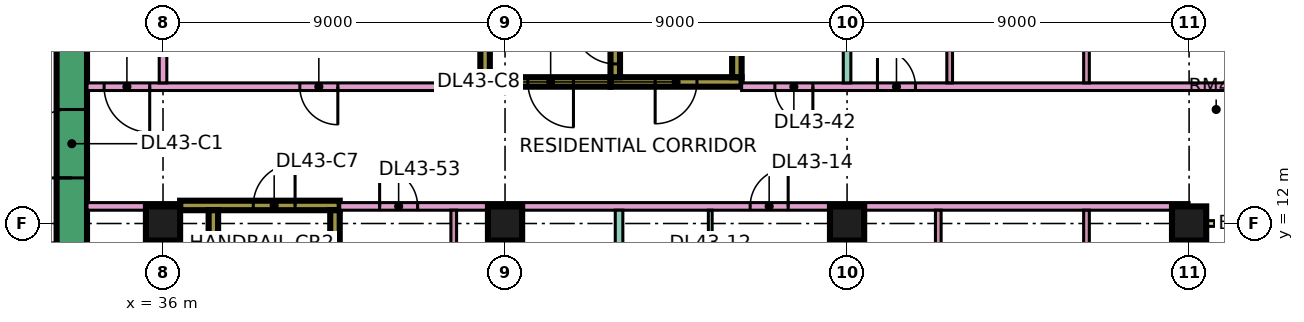
"""IFC4 building model, lengths in metres.
Left out: names, types, materials, properties, quantities, classifications, styles, units other than length and angle.
Written with IfcOpenShell. Run it as: python <this file> out.ifc"""

import sys

from ifc_helpers import new_model, si_unit, direction, frame, frame_2d, origin, origin_2d, place, context, subcontext, project, spatial, rectangle, extrude, element, fill, save


model = new_model("IFC4")
c1 = context("Model", 3, precision=1e-05, world=origin(), true_north=direction((0.0, 1.0)))
c2 = subcontext(c1, "Body", "Model", "MODEL_VIEW")
j1 = project(units=[si_unit("LENGTHUNIT", "METRE"), si_unit("PLANEANGLEUNIT", "RADIAN")], contexts=[c1])
p1 = place(None, origin())
s1 = spatial("IfcSite", under=j1, at=p1, CompositionType="ELEMENT")
p2 = place(p1, origin())
s2 = spatial("IfcBuilding", under=s1, at=p2, CompositionType="ELEMENT")
p3 = place(p2, frame((0.0, 0.0, 187.4)))
s3 = spatial("IfcBuildingStorey", under=s2, at=p3, CompositionType="ELEMENT", Elevation=187.4)
for number, where, z_axis, x_axis in (
    (1, (36.0, 12.0, 0.0), (0.0, 0.0, 1.0), (1.0, 0.0, 0.0)),
    (2, (45.0, 12.0, 0.0), (0.0, 0.0, 1.0), (1.0, 0.0, 0.0)),
    (3, (54.0, 12.0, 0.0), (0.0, 0.0, 1.0), (1.0, 0.0, 0.0)),
    (4, (63.0, 12.0, 0.0), (0.0, 0.0, 1.0), (1.0, 0.0, 0.0)),
):
    element("IfcColumn", number, at=place(p3, frame(where, z_axis=z_axis, x_axis=x_axis)), inside=s3, PredefinedType="COLUMN", context=c2, shape_type="SweptSolid", body=[
        extrude(rectangle(XDim=0.9, YDim=0.9, at=origin_2d()), origin(), (0.0, 0.0, 1.0), 3.75),
    ])
p4 = place(p3, frame((33.6, 7.8, 0.0), z_axis=(0.0, 0.0, 1.0), x_axis=(0.0, 1.0, 0.0)))
e5 = element("IfcWall", 5, at=p4, inside=s3, PredefinedType="SHEAR", context=c2, shape_type="SweptSolid", body=[
    extrude(rectangle(XDim=11.4, YDim=0.8, at=frame_2d((5.7, 0.0))), origin(), (0.0, 0.0, 1.0), 3.75),
])
p5 = place(p4, frame((5.4, 0.0, 0.0)))
e6 = element("IfcOpeningElement", 6, at=p5, cuts=e5, PredefinedType="OPENING", context=c2, shape_type="SweptSolid", body=[
    extrude(rectangle(XDim=1.8, YDim=2.4, at=frame_2d((0.9, 1.2))), frame((0.0, 0.41, 0.0), z_axis=(0.0, -1.0, 0.0), x_axis=(1.0, 0.0, 0.0)), (0.0, 0.0, 1.0), 0.82),
])
p6 = place(p3, frame((36.45, 12.475, 0.0), z_axis=(0.0, 0.0, 1.0), x_axis=(1.0, 0.0, 0.0)))
e7 = element("IfcWall", 7, at=p6, inside=s3, PredefinedType="SHEAR", context=c2, shape_type="SweptSolid", body=[
    extrude(rectangle(XDim=4.2, YDim=0.25, at=frame_2d((2.1, 0.0))), origin(), (0.0, 0.0, 1.0), 3.75),
])
p7 = place(p6, frame((1.925, 0.0, 0.0)))
e8 = element("IfcOpeningElement", 8, at=p7, cuts=e7, PredefinedType="OPENING", context=c2, shape_type="SweptSolid", body=[
    extrude(rectangle(XDim=1.1, YDim=2.2, at=frame_2d((0.55, 1.1))), frame((0.0, 0.135, 0.0), z_axis=(0.0, -1.0, 0.0), x_axis=(1.0, 0.0, 0.0)), (0.0, 0.0, 1.0), 0.27),
])
for number, where, z_axis, x_axis in (
    (9, (37.325, 5.85, 0.0), (0.0, 0.0, 1.0), (0.0, 1.0, 0.0)),
    (10, (40.525, 5.85, 0.0), (0.0, 0.0, 1.0), (0.0, 1.0, 0.0)),
):
    element("IfcWall", number, at=place(p3, frame(where, z_axis=z_axis, x_axis=x_axis)), inside=s3, PredefinedType="SHEAR", context=c2, shape_type="SweptSolid", body=[
        extrude(rectangle(XDim=6.5, YDim=0.25, at=frame_2d((3.25, 0.0))), origin(), (0.0, 0.0, 1.0), 3.75),
    ])
p8 = place(p3, frame((47.775, 15.725, 0.0), z_axis=(0.0, 0.0, 1.0), x_axis=(1.0, 0.0, 0.0)))
e11 = element("IfcWall", 11, at=p8, inside=s3, PredefinedType="SHEAR", context=c2, shape_type="SweptSolid", body=[
    extrude(rectangle(XDim=3.45, YDim=0.25, at=frame_2d((1.725, 0.0))), origin(), (0.0, 0.0, 1.0), 3.75),
])
p9 = place(p8, frame((1.175, 0.0, 0.0)))
e12 = element("IfcOpeningElement", 12, at=p9, cuts=e11, PredefinedType="OPENING", context=c2, shape_type="SweptSolid", body=[
    extrude(rectangle(XDim=1.1, YDim=2.2, at=frame_2d((0.55, 1.1))), frame((0.0, 0.135, 0.0), z_axis=(0.0, -1.0, 0.0), x_axis=(1.0, 0.0, 0.0)), (0.0, 0.0, 1.0), 0.27),
])
p10 = place(p3, frame((47.9, 15.85, 0.0), z_axis=(0.0, 0.0, 1.0), x_axis=(0.0, 1.0, 0.0)))
e13 = element("IfcWall", 13, at=p10, inside=s3, PredefinedType="SHEAR", context=c2, shape_type="SweptSolid", body=[
    extrude(rectangle(XDim=6.5, YDim=0.25, at=frame_2d((3.25, 0.0))), origin(), (0.0, 0.0, 1.0), 3.75),
])
p11 = place(p10, frame((0.35, 0.0, 0.0)))
e14 = element("IfcOpeningElement", 14, at=p11, cuts=e13, PredefinedType="OPENING", context=c2, shape_type="SweptSolid", body=[
    extrude(rectangle(XDim=1.1, YDim=2.2, at=frame_2d((0.55, 1.1))), frame((0.0, 0.135, 0.0), z_axis=(0.0, -1.0, 0.0), x_axis=(1.0, 0.0, 0.0)), (0.0, 0.0, 1.0), 0.27),
])
p12 = place(p3, frame((51.1, 15.85, 0.0), z_axis=(0.0, 0.0, 1.0), x_axis=(0.0, 1.0, 0.0)))
e15 = element("IfcWall", 15, at=p12, inside=s3, PredefinedType="SHEAR", context=c2, shape_type="SweptSolid", body=[
    extrude(rectangle(XDim=6.5, YDim=0.25, at=frame_2d((3.25, 0.0))), origin(), (0.0, 0.0, 1.0), 3.75),
])
p13 = place(p3, frame((44.35, 15.725, 0.0), z_axis=(0.0, 0.0, 1.0), x_axis=(1.0, 0.0, 0.0)))
e16 = element("IfcWall", 16, at=p13, inside=s3, PredefinedType="SHEAR", context=c2, shape_type="SweptSolid", body=[
    extrude(rectangle(XDim=3.425, YDim=0.25, at=frame_2d((1.712, 0.0))), origin(), (0.0, 0.0, 1.0), 3.75),
])
p14 = place(p13, frame((1.25, 0.0, 0.0)))
e17 = element("IfcOpeningElement", 17, at=p14, cuts=e16, PredefinedType="OPENING", context=c2, shape_type="SweptSolid", body=[
    extrude(rectangle(XDim=1.2, YDim=2.2, at=frame_2d((0.6, 1.1))), frame((0.0, 0.135, 0.0), z_axis=(0.0, -1.0, 0.0), x_axis=(1.0, 0.0, 0.0)), (0.0, 0.0, 1.0), 0.27),
])
p15 = place(p3, frame((44.475, 15.85, 0.0), z_axis=(0.0, 0.0, 1.0), x_axis=(0.0, 1.0, 0.0)))
e18 = element("IfcWall", 18, at=p15, inside=s3, PredefinedType="SHEAR", context=c2, shape_type="SweptSolid", body=[
    extrude(rectangle(XDim=6.5, YDim=0.25, at=frame_2d((3.25, 0.0))), origin(), (0.0, 0.0, 1.0), 3.75),
])
p16 = place(p15, frame((1.75, 0.0, 0.0)))
e19 = element("IfcOpeningElement", 19, at=p16, cuts=e18, PredefinedType="OPENING", context=c2, shape_type="SweptSolid", body=[
    extrude(rectangle(XDim=1.1, YDim=2.2, at=frame_2d((0.55, 1.1))), frame((0.0, 0.135, 0.0), z_axis=(0.0, -1.0, 0.0), x_axis=(1.0, 0.0, 0.0)), (0.0, 0.0, 1.0), 0.27),
])
p17 = place(p15, frame((4.3, 0.0, 0.0)))
e20 = element("IfcOpeningElement", 20, at=p17, cuts=e18, PredefinedType="OPENING", context=c2, shape_type="SweptSolid", body=[
    extrude(rectangle(XDim=1.1, YDim=2.2, at=frame_2d((0.55, 1.1))), frame((0.0, 0.135, 0.0), z_axis=(0.0, -1.0, 0.0), x_axis=(1.0, 0.0, 0.0)), (0.0, 0.0, 1.0), 0.27),
])
p18 = place(p3, frame((63.0, 1.575, 0.0), z_axis=(0.0, 0.0, 1.0), x_axis=(0.0, 1.0, 0.0)))
e21 = element("IfcWall", 21, at=p18, inside=s3, PredefinedType="SOLIDWALL", context=c2, shape_type="SweptSolid", body=[
    extrude(rectangle(XDim=10.35, YDim=0.15, at=frame_2d((5.175, 0.0))), origin(), (0.0, 0.0, 1.0), 3.35),
])
p19 = place(p18, frame((1.837, 0.0, 0.0)))
e22 = element("IfcOpeningElement", 22, at=p19, cuts=e21, PredefinedType="OPENING", context=c2, shape_type="SweptSolid", body=[
    extrude(rectangle(XDim=1.8, YDim=2.4, at=frame_2d((0.9, 1.2))), frame((0.0, 0.085, 0.0), z_axis=(0.0, -1.0, 0.0), x_axis=(1.0, 0.0, 0.0)), (0.0, 0.0, 1.0), 0.17),
])
p20 = place(p18, frame((7.675, 0.0, 1.7)))
e23 = element("IfcOpeningElement", 23, at=p20, cuts=e21, PredefinedType="OPENING", context=c2, shape_type="SweptSolid", body=[
    extrude(rectangle(XDim=1.2, YDim=0.9, at=frame_2d((0.6, 0.45))), frame((0.0, 0.085, 0.0), z_axis=(0.0, -1.0, 0.0), x_axis=(1.0, 0.0, 0.0)), (0.0, 0.0, 1.0), 0.17),
])
p21 = place(p3, frame((64.5, 12.0, 0.0), z_axis=(0.0, 0.0, 1.0), x_axis=(-1.0, 0.0, 0.0)))
e24 = element("IfcWall", 24, at=p21, inside=s3, PredefinedType="SOLIDWALL", context=c2, shape_type="SweptSolid", body=[
    extrude(rectangle(XDim=1.5, YDim=0.15, at=frame_2d((0.75, 0.0))), origin(), (0.0, 0.0, 1.0), 3.35),
])
p22 = place(p3, frame((34.0, 12.45, 0.0), z_axis=(0.0, 0.0, 1.0), x_axis=(1.0, 0.0, 0.0)))
e25 = element("IfcWall", 25, at=p22, inside=s3, PredefinedType="PARTITIONING", context=c2, shape_type="SweptSolid", body=[
    extrude(rectangle(XDim=2.451, YDim=0.2, at=frame_2d((1.226, 0.0))), origin(), (0.0, 0.0, 1.0), 3.35),
])
p23 = place(p3, frame((34.0, 15.6, 0.0), z_axis=(0.0, 0.0, 1.0), x_axis=(1.0, 0.0, 0.0)))
e26 = element("IfcWall", 26, at=p23, inside=s3, PredefinedType="PARTITIONING", context=c2, shape_type="SweptSolid", body=[
    extrude(rectangle(XDim=10.35, YDim=0.2, at=frame_2d((5.175, 0.0))), origin(), (0.0, 0.0, 1.0), 3.35),
])
p24 = place(p23, frame((5.6, 0.0, 0.0)))
e27 = element("IfcOpeningElement", 27, at=p24, cuts=e26, PredefinedType="OPENING", context=c2, shape_type="SweptSolid", body=[
    extrude(rectangle(XDim=1.0, YDim=2.1, at=frame_2d((0.5, 1.05))), frame((0.0, 0.11, 0.0), z_axis=(0.0, -1.0, 0.0), x_axis=(1.0, 0.0, 0.0)), (0.0, 0.0, 1.0), 0.22),
])
p25 = place(p23, frame((0.45, 0.0, 0.0)))
e28 = element("IfcOpeningElement", 28, at=p25, cuts=e26, PredefinedType="OPENING", context=c2, shape_type="SweptSolid", body=[
    extrude(rectangle(XDim=1.2, YDim=2.1, at=frame_2d((0.6, 1.05))), frame((0.0, 0.11, 0.0), z_axis=(0.0, -1.0, 0.0), x_axis=(1.0, 0.0, 0.0)), (0.0, 0.0, 1.0), 0.22),
])
p26 = place(p3, frame((36.0, 15.7, 0.0), z_axis=(0.0, 0.0, 1.0), x_axis=(0.0, 1.0, 0.0)))
e29 = element("IfcWall", 29, at=p26, inside=s3, PredefinedType="PARTITIONING", context=c2, shape_type="SweptSolid", body=[
    extrude(rectangle(XDim=8.3, YDim=0.2, at=frame_2d((4.15, 0.0))), origin(), (0.0, 0.0, 1.0), 3.35),
])
p27 = place(p3, frame((40.65, 12.45, 0.0), z_axis=(0.0, 0.0, 1.0), x_axis=(1.0, 0.0, 0.0)))
e30 = element("IfcWall", 30, at=p27, inside=s3, PredefinedType="PARTITIONING", context=c2, shape_type="SweptSolid", body=[
    extrude(rectangle(XDim=22.35, YDim=0.2, at=frame_2d((11.175, 0.0))), origin(), (0.0, 0.0, 1.0), 3.35),
])
p28 = place(p27, frame((10.8, 0.0, 0.0)))
e31 = element("IfcOpeningElement", 31, at=p28, cuts=e30, PredefinedType="OPENING", context=c2, shape_type="SweptSolid", body=[
    extrude(rectangle(XDim=1.0, YDim=2.1, at=frame_2d((0.5, 1.05))), frame((0.0, 0.11, 0.0), z_axis=(0.0, -1.0, 0.0), x_axis=(1.0, 0.0, 0.0)), (0.0, 0.0, 1.0), 0.22),
])
p29 = place(p27, frame((1.05, 0.0, 0.0)))
e32 = element("IfcOpeningElement", 32, at=p29, cuts=e30, PredefinedType="OPENING", context=c2, shape_type="SweptSolid", body=[
    extrude(rectangle(XDim=1.0, YDim=2.1, at=frame_2d((0.5, 1.05))), frame((0.0, 0.11, 0.0), z_axis=(0.0, -1.0, 0.0), x_axis=(1.0, 0.0, 0.0)), (0.0, 0.0, 1.0), 0.22),
])
p30 = place(p3, frame((43.65, 5.825, 0.0), z_axis=(0.0, 0.0, 1.0), x_axis=(0.0, 1.0, 0.0)))
e33 = element("IfcWall", 33, at=p30, inside=s3, PredefinedType="PARTITIONING", context=c2, shape_type="SweptSolid", body=[
    extrude(rectangle(XDim=6.525, YDim=0.15, at=frame_2d((3.263, 0.0))), origin(), (0.0, 0.0, 1.0), 3.35),
])
p31 = place(p30, frame((4.425, 0.0, 0.0)))
e34 = element("IfcOpeningElement", 34, at=p31, cuts=e33, PredefinedType="OPENING", context=c2, shape_type="SweptSolid", body=[
    extrude(rectangle(XDim=0.9, YDim=2.1, at=frame_2d((0.45, 1.05))), frame((0.0, 0.085, 0.0), z_axis=(0.0, -1.0, 0.0), x_axis=(1.0, 0.0, 0.0)), (0.0, 0.0, 1.0), 0.17),
])
p32 = place(p3, frame((48.0, 0.0, 0.0), z_axis=(0.0, 0.0, 1.0), x_axis=(0.0, 1.0, 0.0)))
e35 = element("IfcWall", 35, at=p32, inside=s3, PredefinedType="PARTITIONING", context=c2, shape_type="SweptSolid", body=[
    extrude(rectangle(XDim=12.35, YDim=0.2, at=frame_2d((6.175, 0.0))), origin(), (0.0, 0.0, 1.0), 3.35),
])
p33 = place(p3, frame((50.4, 8.2, 0.0), z_axis=(0.0, 0.0, 1.0), x_axis=(0.0, 1.0, 0.0)))
e36 = element("IfcWall", 36, at=p33, inside=s3, PredefinedType="PARTITIONING", context=c2, shape_type="SweptSolid", body=[
    extrude(rectangle(XDim=4.15, YDim=0.1, at=frame_2d((2.075, 0.0))), origin(), (0.0, 0.0, 1.0), 3.35),
])
p34 = place(p33, frame((1.7, 0.0, 0.0)))
e37 = element("IfcOpeningElement", 37, at=p34, cuts=e36, PredefinedType="OPENING", context=c2, shape_type="SweptSolid", body=[
    extrude(rectangle(XDim=0.9, YDim=2.1, at=frame_2d((0.45, 1.05))), frame((0.0, 0.06, 0.0), z_axis=(0.0, -1.0, 0.0), x_axis=(1.0, 0.0, 0.0)), (0.0, 0.0, 1.0), 0.12),
])
p35 = place(p3, frame((51.225, 15.6, 0.0), z_axis=(0.0, 0.0, 1.0), x_axis=(1.0, 0.0, 0.0)))
e38 = element("IfcWall", 38, at=p35, inside=s3, PredefinedType="PARTITIONING", context=c2, shape_type="SweptSolid", body=[
    extrude(rectangle(XDim=13.125, YDim=0.2, at=frame_2d((6.562, 0.0))), origin(), (0.0, 0.0, 1.0), 3.35),
])
p36 = place(p35, frame((3.575, 0.0, 0.0)))
e39 = element("IfcOpeningElement", 39, at=p36, cuts=e38, PredefinedType="OPENING", context=c2, shape_type="SweptSolid", body=[
    extrude(rectangle(XDim=1.0, YDim=2.1, at=frame_2d((0.5, 1.05))), frame((0.0, 0.11, 0.0), z_axis=(0.0, -1.0, 0.0), x_axis=(1.0, 0.0, 0.0)), (0.0, 0.0, 1.0), 0.22),
])
p37 = place(p35, frame((0.875, 0.0, 0.0)))
e40 = element("IfcOpeningElement", 40, at=p37, cuts=e38, PredefinedType="OPENING", context=c2, shape_type="SweptSolid", body=[
    extrude(rectangle(XDim=1.0, YDim=2.1, at=frame_2d((0.5, 1.05))), frame((0.0, 0.11, 0.0), z_axis=(0.0, -1.0, 0.0), x_axis=(1.0, 0.0, 0.0)), (0.0, 0.0, 1.0), 0.22),
])
p38 = place(p3, frame((54.0, 15.7, 0.0), z_axis=(0.0, 0.0, 1.0), x_axis=(0.0, 1.0, 0.0)))
e41 = element("IfcWall", 41, at=p38, inside=s3, PredefinedType="PARTITIONING", context=c2, shape_type="SweptSolid", body=[
    extrude(rectangle(XDim=8.226, YDim=0.2, at=frame_2d((4.113, 0.0))), origin(), (0.0, 0.0, 1.0), 3.35),
])
p39 = place(p3, frame((56.4, 8.325, 0.0), z_axis=(0.0, 0.0, 1.0), x_axis=(0.0, 1.0, 0.0)))
e42 = element("IfcWall", 42, at=p39, inside=s3, PredefinedType="PARTITIONING", context=c2, shape_type="SweptSolid", body=[
    extrude(rectangle(XDim=4.025, YDim=0.15, at=frame_2d((2.013, 0.0))), origin(), (0.0, 0.0, 1.0), 3.35),
])
p40 = place(p3, frame((56.7, 15.7, 0.0), z_axis=(0.0, 0.0, 1.0), x_axis=(0.0, 1.0, 0.0)))
e43 = element("IfcWall", 43, at=p40, inside=s3, PredefinedType="PARTITIONING", context=c2, shape_type="SweptSolid", body=[
    extrude(rectangle(XDim=2.525, YDim=0.15, at=frame_2d((1.263, 0.0))), origin(), (0.0, 0.0, 1.0), 3.35),
])
p41 = place(p3, frame((60.3, 8.325, 0.0), z_axis=(0.0, 0.0, 1.0), x_axis=(0.0, 1.0, 0.0)))
e44 = element("IfcWall", 44, at=p41, inside=s3, PredefinedType="PARTITIONING", context=c2, shape_type="SweptSolid", body=[
    extrude(rectangle(XDim=4.025, YDim=0.15, at=frame_2d((2.013, 0.0))), origin(), (0.0, 0.0, 1.0), 3.35),
])
p42 = place(p3, frame((60.3, 15.7, 0.0), z_axis=(0.0, 0.0, 1.0), x_axis=(0.0, 1.0, 0.0)))
e45 = element("IfcWall", 45, at=p42, inside=s3, PredefinedType="PARTITIONING", context=c2, shape_type="SweptSolid", body=[
    extrude(rectangle(XDim=2.525, YDim=0.15, at=frame_2d((1.263, 0.0))), origin(), (0.0, 0.0, 1.0), 3.35),
])
p43 = place(p5, origin())
e46 = element("IfcDoor", 46, at=p43, inside=s3, OperationType="DOUBLE_DOOR_SINGLE_SWING", PredefinedType="DOOR", context=c2, shape_type="SweptSolid", body=[
    extrude(rectangle(XDim=1.8, YDim=2.4, at=frame_2d((0.9, 1.2))), frame((0.0, 0.025, 0.0), z_axis=(0.0, -1.0, 0.0), x_axis=(1.0, 0.0, 0.0)), (0.0, 0.0, 1.0), 0.05),
])
fill(e6, e46)
p44 = place(p7, frame((1.1, 0.0, 0.0), z_axis=(0.0, 0.0, 1.0), x_axis=(-1.0, 0.0, 0.0)))
e47 = element("IfcDoor", 47, at=p44, inside=s3, OperationType="SINGLE_SWING_RIGHT", PredefinedType="DOOR", context=c2, shape_type="SweptSolid", body=[
    extrude(rectangle(XDim=1.1, YDim=2.2, at=frame_2d((0.55, 1.1))), frame((0.0, 0.025, 0.0), z_axis=(0.0, -1.0, 0.0), x_axis=(1.0, 0.0, 0.0)), (0.0, 0.0, 1.0), 0.05),
])
fill(e8, e47)
p45 = place(p9, frame((1.1, 0.0, 0.0), z_axis=(0.0, 0.0, 1.0), x_axis=(-1.0, 0.0, 0.0)))
e48 = element("IfcDoor", 48, at=p45, inside=s3, OperationType="SINGLE_SWING_LEFT", PredefinedType="DOOR", context=c2, shape_type="SweptSolid", body=[
    extrude(rectangle(XDim=1.1, YDim=2.2, at=frame_2d((0.55, 1.1))), frame((0.0, 0.025, 0.0), z_axis=(0.0, -1.0, 0.0), x_axis=(1.0, 0.0, 0.0)), (0.0, 0.0, 1.0), 0.05),
])
fill(e12, e48)
p46 = place(p14, origin())
e49 = element("IfcDoor", 49, at=p46, inside=s3, OperationType="SINGLE_SWING_RIGHT", PredefinedType="DOOR", context=c2, shape_type="SweptSolid", body=[
    extrude(rectangle(XDim=1.2, YDim=2.2, at=frame_2d((0.6, 1.1))), frame((0.0, 0.025, 0.0), z_axis=(0.0, -1.0, 0.0), x_axis=(1.0, 0.0, 0.0)), (0.0, 0.0, 1.0), 0.05),
])
fill(e17, e49)
p47 = place(p11, frame((1.1, 0.0, 0.0), z_axis=(0.0, 0.0, 1.0), x_axis=(-1.0, 0.0, 0.0)))
e50 = element("IfcDoor", 50, at=p47, inside=s3, OperationType="SINGLE_SWING_RIGHT", PredefinedType="DOOR", context=c2, shape_type="SweptSolid", body=[
    extrude(rectangle(XDim=1.1, YDim=2.2, at=frame_2d((0.55, 1.1))), frame((0.0, 0.025, 0.0), z_axis=(0.0, -1.0, 0.0), x_axis=(1.0, 0.0, 0.0)), (0.0, 0.0, 1.0), 0.05),
])
fill(e14, e50)
p48 = place(p24, origin())
e51 = element("IfcDoor", 51, at=p48, inside=s3, OperationType="SINGLE_SWING_RIGHT", PredefinedType="DOOR", context=c2, shape_type="SweptSolid", body=[
    extrude(rectangle(XDim=1.0, YDim=2.1, at=frame_2d((0.5, 1.05))), frame((0.0, 0.025, 0.0), z_axis=(0.0, -1.0, 0.0), x_axis=(1.0, 0.0, 0.0)), (0.0, 0.0, 1.0), 0.05),
])
fill(e27, e51)
p49 = place(p36, origin())
e52 = element("IfcDoor", 52, at=p49, inside=s3, OperationType="SINGLE_SWING_LEFT", PredefinedType="DOOR", context=c2, shape_type="SweptSolid", body=[
    extrude(rectangle(XDim=1.0, YDim=2.1, at=frame_2d((0.5, 1.05))), frame((0.0, 0.025, 0.0), z_axis=(0.0, -1.0, 0.0), x_axis=(1.0, 0.0, 0.0)), (0.0, 0.0, 1.0), 0.05),
])
fill(e39, e52)
p50 = place(p28, frame((1.0, 0.0, 0.0), z_axis=(0.0, 0.0, 1.0), x_axis=(-1.0, 0.0, 0.0)))
e53 = element("IfcDoor", 53, at=p50, inside=s3, OperationType="SINGLE_SWING_RIGHT", PredefinedType="DOOR", context=c2, shape_type="SweptSolid", body=[
    extrude(rectangle(XDim=1.0, YDim=2.1, at=frame_2d((0.5, 1.05))), frame((0.0, 0.025, 0.0), z_axis=(0.0, -1.0, 0.0), x_axis=(1.0, 0.0, 0.0)), (0.0, 0.0, 1.0), 0.05),
])
fill(e31, e53)
p51 = place(p25, origin())
e54 = element("IfcDoor", 54, at=p51, inside=s3, OperationType="SINGLE_SWING_RIGHT", PredefinedType="DOOR", context=c2, shape_type="SweptSolid", body=[
    extrude(rectangle(XDim=1.2, YDim=2.1, at=frame_2d((0.6, 1.05))), frame((0.0, 0.025, 0.0), z_axis=(0.0, -1.0, 0.0), x_axis=(1.0, 0.0, 0.0)), (0.0, 0.0, 1.0), 0.05),
])
fill(e28, e54)
p52 = place(p37, origin())
e55 = element("IfcDoor", 55, at=p52, inside=s3, OperationType="SINGLE_SWING_RIGHT", PredefinedType="DOOR", context=c2, shape_type="SweptSolid", body=[
    extrude(rectangle(XDim=1.0, YDim=2.1, at=frame_2d((0.5, 1.05))), frame((0.0, 0.025, 0.0), z_axis=(0.0, -1.0, 0.0), x_axis=(1.0, 0.0, 0.0)), (0.0, 0.0, 1.0), 0.05),
])
fill(e40, e55)
p53 = place(p29, origin())
e56 = element("IfcDoor", 56, at=p53, inside=s3, OperationType="SINGLE_SWING_LEFT", PredefinedType="DOOR", context=c2, shape_type="SweptSolid", body=[
    extrude(rectangle(XDim=1.0, YDim=2.1, at=frame_2d((0.5, 1.05))), frame((0.0, 0.025, 0.0), z_axis=(0.0, -1.0, 0.0), x_axis=(1.0, 0.0, 0.0)), (0.0, 0.0, 1.0), 0.05),
])
fill(e32, e56)
save(model, sys.argv[1])
